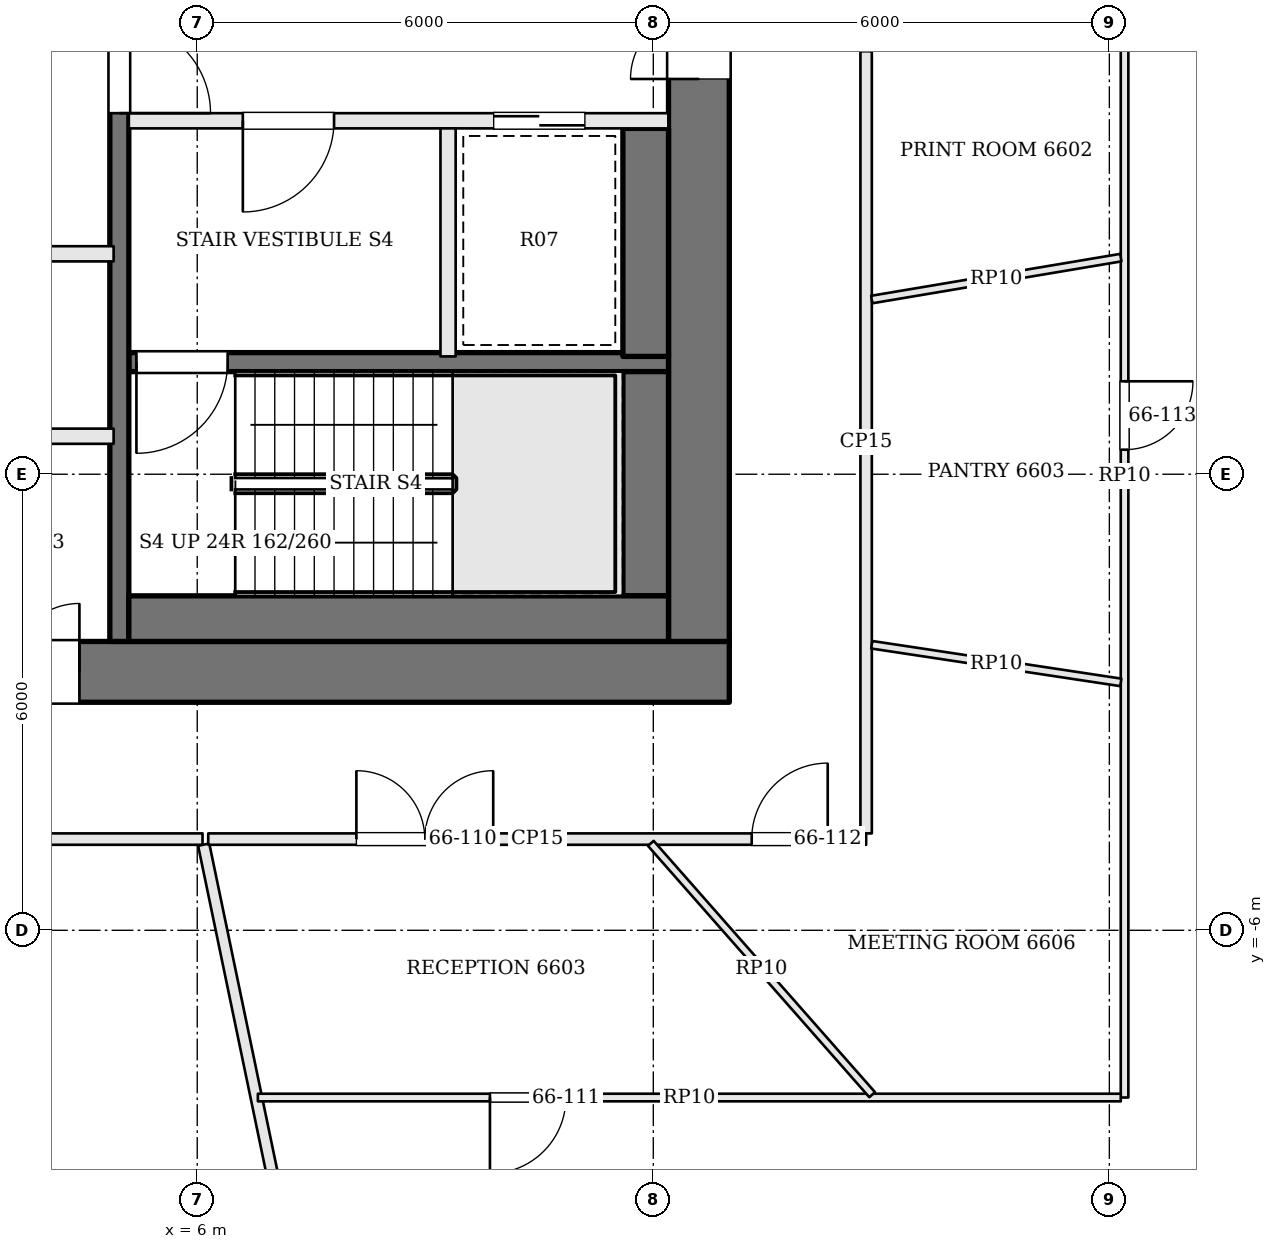
"""IFC4 building model, lengths in metres.
Left out: names, types, materials, properties, quantities, classifications, styles, units other than length and angle.
Written with IfcOpenShell. Run it as: python <this file> out.ifc"""

import sys

from ifc_helpers import new_model, si_unit, direction, frame, frame_2d, origin, place, context, subcontext, project, spatial, rectangle, extrude, element, fill, save


model = new_model("IFC4")
c1 = context("Model", 3, precision=1e-05, world=origin(), true_north=direction((0.0, 1.0)))
c2 = subcontext(c1, "Body", "Model", "MODEL_VIEW")
j1 = project(units=[si_unit("LENGTHUNIT", "METRE"), si_unit("PLANEANGLEUNIT", "RADIAN")], contexts=[c1])
p1 = place(None, origin())
s1 = spatial("IfcSite", under=j1, at=p1, CompositionType="ELEMENT")
p2 = place(p1, origin())
s2 = spatial("IfcBuilding", under=s1, at=p2, CompositionType="ELEMENT")
p3 = place(p2, frame((0.0, 0.0, 268.8)))
s3 = spatial("IfcBuildingStorey", under=s2, at=p3, CompositionType="ELEMENT", Elevation=268.8)
p4 = place(p3, frame((-13.0, -2.6, 0.0), z_axis=(0.0, 0.0, 1.0), x_axis=(1.0, 0.0, 0.0)))
e1 = element("IfcWall", 1, at=p4, inside=s3, PredefinedType="SHEAR", context=c2, shape_type="SweptSolid", body=[
    extrude(rectangle(XDim=26.0, YDim=0.8, at=frame_2d((13.0, 0.0))), origin(), (0.0, 0.0, 1.0), 3.9),
])
p5 = place(p4, frame((9.2, 0.0, 0.0)))
e2 = element("IfcOpeningElement", 2, at=p5, cuts=e1, PredefinedType="OPENING", context=c2, shape_type="SweptSolid", body=[
    extrude(rectangle(XDim=0.9, YDim=2.1, at=frame_2d((0.45, 1.05))), frame((0.0, 0.41, 0.0), z_axis=(0.0, -1.0, 0.0), x_axis=(1.0, 0.0, 0.0)), (0.0, 0.0, 1.0), 0.82),
])
p6 = place(p4, frame((12.3, 0.0, 0.0)))
e3 = element("IfcOpeningElement", 3, at=p6, cuts=e1, PredefinedType="OPENING", context=c2, shape_type="SweptSolid", body=[
    extrude(rectangle(XDim=0.9, YDim=2.1, at=frame_2d((0.45, 1.05))), frame((0.0, 0.41, 0.0), z_axis=(0.0, -1.0, 0.0), x_axis=(1.0, 0.0, 0.0)), (0.0, 0.0, 1.0), 0.82),
])
p7 = place(p4, frame((14.7, 0.0, 0.0)))
e4 = element("IfcOpeningElement", 4, at=p7, cuts=e1, PredefinedType="OPENING", context=c2, shape_type="SweptSolid", body=[
    extrude(rectangle(XDim=1.0, YDim=2.1, at=frame_2d((0.5, 1.05))), frame((0.0, 0.41, 0.0), z_axis=(0.0, -1.0, 0.0), x_axis=(1.0, 0.0, 0.0)), (0.0, 0.0, 1.0), 0.82),
])
p8 = place(p4, frame((16.55, 0.0, 0.0)))
e5 = element("IfcOpeningElement", 5, at=p8, cuts=e1, PredefinedType="OPENING", context=c2, shape_type="SweptSolid", body=[
    extrude(rectangle(XDim=0.9, YDim=2.1, at=frame_2d((0.45, 1.05))), frame((0.0, 0.41, 0.0), z_axis=(0.0, -1.0, 0.0), x_axis=(1.0, 0.0, 0.0)), (0.0, 0.0, 1.0), 0.82),
])
p9 = place(p3, frame((12.6, -2.2, 0.0), z_axis=(0.0, 0.0, 1.0), x_axis=(0.0, 1.0, 0.0)))
e6 = element("IfcWall", 6, at=p9, inside=s3, PredefinedType="SHEAR", context=c2, shape_type="SweptSolid", body=[
    extrude(rectangle(XDim=13.4, YDim=0.8, at=frame_2d((6.7, 0.0))), origin(), (0.0, 0.0, 1.0), 3.9),
])
p10 = place(p9, frame((7.4, 0.0, 0.0)))
e7 = element("IfcOpeningElement", 7, at=p10, cuts=e6, PredefinedType="OPENING", context=c2, shape_type="SweptSolid", body=[
    extrude(rectangle(XDim=1.8, YDim=2.1, at=frame_2d((0.9, 1.05))), frame((0.0, 0.41, 0.0), z_axis=(0.0, -1.0, 0.0), x_axis=(1.0, 0.0, 0.0)), (0.0, 0.0, 1.0), 0.82),
])
p11 = place(p3, frame((12.2, 4.65, 0.0), z_axis=(0.0, 0.0, 1.0), x_axis=(-1.0, 0.0, 0.0)))
e8 = element("IfcWall", 8, at=p11, inside=s3, PredefinedType="SOLIDWALL", context=c2, shape_type="SweptSolid", body=[
    extrude(rectangle(XDim=7.1, YDim=0.2, at=frame_2d((3.55, 0.0))), origin(), (0.0, 0.0, 1.0), 3.7),
])
p12 = place(p11, frame((4.4, 0.0, 0.0)))
e9 = element("IfcOpeningElement", 9, at=p12, cuts=e8, PredefinedType="OPENING", context=c2, shape_type="SweptSolid", body=[
    extrude(rectangle(XDim=1.2, YDim=2.1, at=frame_2d((0.6, 1.05))), frame((0.0, 0.11, 0.0), z_axis=(0.0, -1.0, 0.0), x_axis=(1.0, 0.0, 0.0)), (0.0, 0.0, 1.0), 0.22),
])
p13 = place(p11, frame((1.1, 0.0, 0.0)))
e10 = element("IfcOpeningElement", 10, at=p13, cuts=e8, PredefinedType="OPENING", context=c2, shape_type="SweptSolid", body=[
    extrude(rectangle(XDim=1.2, YDim=2.1, at=frame_2d((0.6, 1.05))), frame((0.0, 0.11, 0.0), z_axis=(0.0, -1.0, 0.0), x_axis=(1.0, 0.0, 0.0)), (0.0, 0.0, 1.0), 0.22),
])
p14 = place(p3, frame((12.2, 1.475, 0.0), z_axis=(0.0, 0.0, 1.0), x_axis=(-1.0, 0.0, 0.0)))
e11 = element("IfcWall", 11, at=p14, inside=s3, PredefinedType="SOLIDWALL", context=c2, shape_type="SweptSolid", body=[
    extrude(rectangle(XDim=7.1, YDim=0.25, at=frame_2d((3.55, 0.0))), origin(), (0.0, 0.0, 1.0), 3.7),
])
p15 = place(p14, frame((5.8, 0.0, 0.0)))
e12 = element("IfcOpeningElement", 12, at=p15, cuts=e11, PredefinedType="OPENING", context=c2, shape_type="SweptSolid", body=[
    extrude(rectangle(XDim=1.2, YDim=2.1, at=frame_2d((0.6, 1.05))), frame((0.0, 0.135, 0.0), z_axis=(0.0, -1.0, 0.0), x_axis=(1.0, 0.0, 0.0)), (0.0, 0.0, 1.0), 0.27),
])
p16 = place(p3, frame((9.3, 4.55, 0.0), z_axis=(0.0, 0.0, 1.0), x_axis=(0.0, -1.0, 0.0)))
e13 = element("IfcWall", 13, at=p16, inside=s3, PredefinedType="SOLIDWALL", context=c2, shape_type="SweptSolid", body=[
    extrude(rectangle(XDim=3.0, YDim=0.2, at=frame_2d((1.5, 0.0))), origin(), (0.0, 0.0, 1.0), 3.7),
])
p17 = place(p3, frame((4.975, 11.2, 0.0), z_axis=(0.0, 0.0, 1.0), x_axis=(0.0, -1.0, 0.0)))
e14 = element("IfcWall", 14, at=p17, inside=s3, PredefinedType="SOLIDWALL", context=c2, shape_type="SweptSolid", body=[
    extrude(rectangle(XDim=13.4, YDim=0.25, at=frame_2d((6.7, 0.0))), origin(), (0.0, 0.0, 1.0), 3.7),
])
p18 = place(p17, frame((5.25, 0.0, 0.0)))
e15 = element("IfcOpeningElement", 15, at=p18, cuts=e14, PredefinedType="OPENING", context=c2, shape_type="SweptSolid", body=[
    extrude(rectangle(XDim=1.2, YDim=2.1, at=frame_2d((0.6, 1.05))), frame((0.0, 0.135, 0.0), z_axis=(0.0, -1.0, 0.0), x_axis=(1.0, 0.0, 0.0)), (0.0, 0.0, 1.0), 0.27),
])
p19 = place(p3, frame((11.9, 4.55, 0.0), z_axis=(0.0, 0.0, 1.0), x_axis=(0.0, -1.0, 0.0)))
e16 = element("IfcWall", 16, at=p19, inside=s3, PredefinedType="SOLIDWALL", context=c2, shape_type="SweptSolid", body=[
    extrude(rectangle(XDim=3.0, YDim=0.6, at=frame_2d((1.5, 0.0))), origin(), (0.0, 0.0, 1.0), 3.7),
])
p20 = place(p3, frame((11.9, 1.35, 0.0), z_axis=(0.0, 0.0, 1.0), x_axis=(0.0, -1.0, 0.0)))
e17 = element("IfcWall", 17, at=p20, inside=s3, PredefinedType="SOLIDWALL", context=c2, shape_type="SweptSolid", body=[
    extrude(rectangle(XDim=2.95, YDim=0.6, at=frame_2d((1.475, 0.0))), origin(), (0.0, 0.0, 1.0), 3.7),
])
p21 = place(p3, frame((12.2, -1.9, 0.0), z_axis=(0.0, 0.0, 1.0), x_axis=(-1.0, 0.0, 0.0)))
e18 = element("IfcWall", 18, at=p21, inside=s3, PredefinedType="SOLIDWALL", context=c2, shape_type="SweptSolid", body=[
    extrude(rectangle(XDim=7.1, YDim=0.6, at=frame_2d((3.55, 0.0))), origin(), (0.0, 0.0, 1.0), 3.7),
])
p22 = place(p3, frame((-4.9, 0.5, 0.0), z_axis=(0.0, 0.0, 1.0), x_axis=(1.0, 0.0, 0.0)))
e19 = element("IfcWall", 19, at=p22, inside=s3, PredefinedType="SOLIDWALL", context=c2, shape_type="SweptSolid", body=[
    extrude(rectangle(XDim=9.8, YDim=0.2, at=frame_2d((4.9, 0.0))), origin(), (0.0, 0.0, 1.0), 3.7),
])
p23 = place(p3, frame((-4.9, 2.9, 0.0), z_axis=(0.0, 0.0, 1.0), x_axis=(1.0, 0.0, 0.0)))
e20 = element("IfcWall", 20, at=p23, inside=s3, PredefinedType="SOLIDWALL", context=c2, shape_type="SweptSolid", body=[
    extrude(rectangle(XDim=9.8, YDim=0.2, at=frame_2d((4.9, 0.0))), origin(), (0.0, 0.0, 1.0), 3.7),
])
p24 = place(p23, frame((0.675, 0.0, 0.0)))
e21 = element("IfcOpeningElement", 21, at=p24, cuts=e20, PredefinedType="OPENING", context=c2, shape_type="SweptSolid", body=[
    extrude(rectangle(XDim=1.1, YDim=2.1, at=frame_2d((0.55, 1.05))), frame((0.0, 0.11, 0.0), z_axis=(0.0, -1.0, 0.0), x_axis=(1.0, 0.0, 0.0)), (0.0, 0.0, 1.0), 0.22),
])
p25 = place(p23, frame((2.613, 0.0, 0.0)))
e22 = element("IfcOpeningElement", 22, at=p25, cuts=e20, PredefinedType="OPENING", context=c2, shape_type="SweptSolid", body=[
    extrude(rectangle(XDim=0.9, YDim=2.1, at=frame_2d((0.45, 1.05))), frame((0.0, 0.11, 0.0), z_axis=(0.0, -1.0, 0.0), x_axis=(1.0, 0.0, 0.0)), (0.0, 0.0, 1.0), 0.22),
])
p26 = place(p23, frame((4.35, 0.0, 0.0)))
e23 = element("IfcOpeningElement", 23, at=p26, cuts=e20, PredefinedType="OPENING", context=c2, shape_type="SweptSolid", body=[
    extrude(rectangle(XDim=1.1, YDim=2.1, at=frame_2d((0.55, 1.05))), frame((0.0, 0.11, 0.0), z_axis=(0.0, -1.0, 0.0), x_axis=(1.0, 0.0, 0.0)), (0.0, 0.0, 1.0), 0.22),
])
p27 = place(p23, frame((7.463, 0.0, 0.0)))
e24 = element("IfcOpeningElement", 24, at=p27, cuts=e20, PredefinedType="OPENING", context=c2, shape_type="SweptSolid", body=[
    extrude(rectangle(XDim=1.0, YDim=2.1, at=frame_2d((0.5, 1.05))), frame((0.0, 0.11, 0.0), z_axis=(0.0, -1.0, 0.0), x_axis=(1.0, 0.0, 0.0)), (0.0, 0.0, 1.0), 0.22),
])
p28 = place(p3, frame((-13.646, -4.8, 0.0), z_axis=(0.0, 0.0, 1.0), x_axis=(1.0, 0.0, 0.0)))
e25 = element("IfcWall", 25, at=p28, inside=s3, PredefinedType="PARTITIONING", context=c2, shape_type="SweptSolid", body=[
    extrude(rectangle(XDim=19.716, YDim=0.15, at=frame_2d((9.858, 0.0))), origin(), (0.0, 0.0, 1.0), 3.198),
])
p29 = place(p28, frame((8.921, 0.0, 0.0)))
e26 = element("IfcOpeningElement", 26, at=p29, cuts=e25, PredefinedType="OPENING", context=c2, shape_type="SweptSolid", body=[
    extrude(rectangle(XDim=1.8, YDim=2.1, at=frame_2d((0.9, 1.05))), frame((0.0, 0.085, 0.0), z_axis=(0.0, -1.0, 0.0), x_axis=(1.0, 0.0, 0.0)), (0.0, 0.0, 1.0), 0.17),
])
p30 = place(p3, frame((8.341, -15.713, 0.0), z_axis=(0.0, 0.0, 1.0), x_axis=(-0.203751717625, 0.97902259298, 0.0)))
e27 = element("IfcWall", 27, at=p30, inside=s3, PredefinedType="PARTITIONING", context=c2, shape_type="SweptSolid", body=[
    extrude(rectangle(XDim=11.072, YDim=0.15, at=frame_2d((5.536, 0.0))), origin(), (0.0, 0.0, 1.0), 3.184),
])
p31 = place(p3, frame((6.145, -4.8, 0.0), z_axis=(0.0, 0.0, 1.0), x_axis=(1.0, 0.0, 0.0)))
e28 = element("IfcWall", 28, at=p31, inside=s3, PredefinedType="PARTITIONING", context=c2, shape_type="SweptSolid", body=[
    extrude(rectangle(XDim=8.655, YDim=0.15, at=frame_2d((4.328, 0.0))), origin(), (0.0, 0.0, 1.0), 3.198),
])
p32 = place(p31, frame((1.949, 0.0, 0.0)))
e29 = element("IfcOpeningElement", 29, at=p32, cuts=e28, PredefinedType="OPENING", context=c2, shape_type="SweptSolid", body=[
    extrude(rectangle(XDim=1.8, YDim=2.1, at=frame_2d((0.9, 1.05))), frame((0.0, 0.085, 0.0), z_axis=(0.0, -1.0, 0.0), x_axis=(1.0, 0.0, 0.0)), (0.0, 0.0, 1.0), 0.17),
])
p33 = place(p31, frame((7.15, 0.0, 0.0)))
e30 = element("IfcOpeningElement", 30, at=p33, cuts=e28, PredefinedType="OPENING", context=c2, shape_type="SweptSolid", body=[
    extrude(rectangle(XDim=1.0, YDim=2.4, at=frame_2d((0.5, 1.2))), frame((0.0, 0.085, 0.0), z_axis=(0.0, -1.0, 0.0), x_axis=(1.0, 0.0, 0.0)), (0.0, 0.0, 1.0), 0.17),
])
p34 = place(p3, frame((14.8, -4.725, 0.0), z_axis=(0.0, 0.0, 1.0), x_axis=(0.0, 1.0, 0.0)))
e31 = element("IfcWall", 31, at=p34, inside=s3, PredefinedType="PARTITIONING", context=c2, shape_type="SweptSolid", body=[
    extrude(rectangle(XDim=10.29, YDim=0.15, at=frame_2d((5.145, 0.0))), origin(), (0.0, 0.0, 1.0), 3.198),
])
p35 = place(p3, frame((18.2, 8.161, 0.0), z_axis=(0.0, 0.0, 1.0), x_axis=(0.0, -1.0, 0.0)))
e32 = element("IfcWall", 32, at=p35, inside=s3, PredefinedType="PARTITIONING", context=c2, shape_type="SweptSolid", body=[
    extrude(rectangle(XDim=16.361, YDim=0.1, at=frame_2d((8.18, 0.0))), origin(), (0.0, 0.0, 1.0), 3.184),
])
p36 = place(p35, frame((6.938, 0.0, 0.0)))
e33 = element("IfcOpeningElement", 33, at=p36, cuts=e32, PredefinedType="OPENING", context=c2, shape_type="SweptSolid", body=[
    extrude(rectangle(XDim=0.9, YDim=2.1, at=frame_2d((0.45, 1.05))), frame((0.0, 0.06, 0.0), z_axis=(0.0, -1.0, 0.0), x_axis=(1.0, 0.0, 0.0)), (0.0, 0.0, 1.0), 0.12),
])
p37 = place(p35, frame((1.652, 0.0, 0.0)))
e34 = element("IfcOpeningElement", 34, at=p37, cuts=e32, PredefinedType="OPENING", context=c2, shape_type="SweptSolid", body=[
    extrude(rectangle(XDim=0.9, YDim=2.1, at=frame_2d((0.45, 1.05))), frame((0.0, 0.06, 0.0), z_axis=(0.0, -1.0, 0.0), x_axis=(1.0, 0.0, 0.0)), (0.0, 0.0, 1.0), 0.12),
])
p38 = place(p3, frame((18.15, -8.2, 0.0), z_axis=(0.0, 0.0, 1.0), x_axis=(-1.0, 0.0, 0.0)))
e35 = element("IfcWall", 35, at=p38, inside=s3, PredefinedType="PARTITIONING", context=c2, shape_type="SweptSolid", body=[
    extrude(rectangle(XDim=11.352, YDim=0.1, at=frame_2d((5.676, 0.0))), origin(), (0.0, 0.0, 1.0), 3.184),
])
p39 = place(p38, frame((7.299, 0.0, 0.0)))
e36 = element("IfcOpeningElement", 36, at=p39, cuts=e35, PredefinedType="OPENING", context=c2, shape_type="SweptSolid", body=[
    extrude(rectangle(XDim=1.0, YDim=2.1, at=frame_2d((0.5, 1.05))), frame((0.0, 0.06, 0.0), z_axis=(0.0, -1.0, 0.0), x_axis=(1.0, 0.0, 0.0)), (0.0, 0.0, 1.0), 0.12),
])
p40 = place(p3, frame((11.967, -4.856, 0.0), z_axis=(0.0, 0.0, 1.0), x_axis=(0.660945113881, -0.750434245245, 0.0)))
e37 = element("IfcWall", 37, at=p40, inside=s3, PredefinedType="PARTITIONING", context=c2, shape_type="SweptSolid", body=[
    extrude(rectangle(XDim=4.406, YDim=0.1, at=frame_2d((2.203, 0.0))), origin(), (0.0, 0.0, 1.0), 3.184),
])
p41 = place(p3, frame((14.874, -2.243, 0.0), z_axis=(0.0, 0.0, 1.0), x_axis=(0.988784515255, -0.149349196157, 0.0)))
e38 = element("IfcWall", 38, at=p41, inside=s3, PredefinedType="PARTITIONING", context=c2, shape_type="SweptSolid", body=[
    extrude(rectangle(XDim=3.313, YDim=0.1, at=frame_2d((1.657, 0.0))), origin(), (0.0, 0.0, 1.0), 3.184),
])
p42 = place(p3, frame((14.874, 2.298, 0.0), z_axis=(0.0, 0.0, 1.0), x_axis=(0.986140556788, 0.165912031684, 0.0)))
e39 = element("IfcWall", 39, at=p42, inside=s3, PredefinedType="PARTITIONING", context=c2, shape_type="SweptSolid", body=[
    extrude(rectangle(XDim=3.323, YDim=0.1, at=frame_2d((1.661, 0.0))), origin(), (0.0, 0.0, 1.0), 3.184),
])
p43 = place(p10, origin())
e40 = element("IfcDoor", 40, at=p43, inside=s3, OperationType="DOUBLE_DOOR_SINGLE_SWING", PredefinedType="DOOR", context=c2, shape_type="SweptSolid", body=[
    extrude(rectangle(XDim=1.8, YDim=2.1, at=frame_2d((0.9, 1.05))), frame((0.0, 0.025, 0.0), z_axis=(0.0, -1.0, 0.0), x_axis=(1.0, 0.0, 0.0)), (0.0, 0.0, 1.0), 0.05),
])
fill(e7, e40)
p44 = place(p18, origin())
e41 = element("IfcDoor", 41, at=p44, inside=s3, OperationType="SINGLE_SWING_RIGHT", PredefinedType="DOOR", context=c2, shape_type="SweptSolid", body=[
    extrude(rectangle(XDim=1.2, YDim=2.1, at=frame_2d((0.6, 1.05))), frame((0.0, 0.025, 0.0), z_axis=(0.0, -1.0, 0.0), x_axis=(1.0, 0.0, 0.0)), (0.0, 0.0, 1.0), 0.05),
])
fill(e15, e41)
p45 = place(p12, origin())
e42 = element("IfcDoor", 42, at=p45, inside=s3, OperationType="SINGLE_SWING_RIGHT", PredefinedType="DOOR", context=c2, shape_type="SweptSolid", body=[
    extrude(rectangle(XDim=1.2, YDim=2.1, at=frame_2d((0.6, 1.05))), frame((0.0, 0.025, 0.0), z_axis=(0.0, -1.0, 0.0), x_axis=(1.0, 0.0, 0.0)), (0.0, 0.0, 1.0), 0.05),
])
fill(e9, e42)
p46 = place(p15, origin())
e43 = element("IfcDoor", 43, at=p46, inside=s3, OperationType="SINGLE_SWING_RIGHT", PredefinedType="DOOR", context=c2, shape_type="SweptSolid", body=[
    extrude(rectangle(XDim=1.2, YDim=2.1, at=frame_2d((0.6, 1.05))), frame((0.0, 0.025, 0.0), z_axis=(0.0, -1.0, 0.0), x_axis=(1.0, 0.0, 0.0)), (0.0, 0.0, 1.0), 0.05),
])
fill(e12, e43)
p47 = place(p13, origin())
e44 = element("IfcDoor", 44, at=p47, inside=s3, OperationType="SLIDING_TO_RIGHT", PredefinedType="DOOR", context=c2, shape_type="SweptSolid", body=[
    extrude(rectangle(XDim=1.2, YDim=2.1, at=frame_2d((0.6, 1.05))), frame((0.0, 0.025, 0.0), z_axis=(0.0, -1.0, 0.0), x_axis=(1.0, 0.0, 0.0)), (0.0, 0.0, 1.0), 0.05),
])
fill(e10, e44)
p48 = place(p8, origin())
e45 = element("IfcDoor", 45, at=p48, inside=s3, OperationType="SINGLE_SWING_RIGHT", PredefinedType="DOOR", context=c2, shape_type="SweptSolid", body=[
    extrude(rectangle(XDim=0.9, YDim=2.1, at=frame_2d((0.45, 1.05))), frame((0.0, 0.025, 0.0), z_axis=(0.0, -1.0, 0.0), x_axis=(1.0, 0.0, 0.0)), (0.0, 0.0, 1.0), 0.05),
])
fill(e5, e45)
p49 = place(p32, origin())
e46 = element("IfcDoor", 46, at=p49, inside=s3, OperationType="DOUBLE_DOOR_SINGLE_SWING", PredefinedType="DOOR", context=c2, shape_type="SweptSolid", body=[
    extrude(rectangle(XDim=1.8, YDim=2.1, at=frame_2d((0.9, 1.05))), frame((0.0, 0.025, 0.0), z_axis=(0.0, -1.0, 0.0), x_axis=(1.0, 0.0, 0.0)), (0.0, 0.0, 1.0), 0.05),
])
fill(e29, e46)
p50 = place(p39, origin())
e47 = element("IfcDoor", 47, at=p50, inside=s3, OperationType="SINGLE_SWING_RIGHT", PredefinedType="DOOR", context=c2, shape_type="SweptSolid", body=[
    extrude(rectangle(XDim=1.0, YDim=2.1, at=frame_2d((0.5, 1.05))), frame((0.0, 0.025, 0.0), z_axis=(0.0, -1.0, 0.0), x_axis=(1.0, 0.0, 0.0)), (0.0, 0.0, 1.0), 0.05),
])
fill(e36, e47)
p51 = place(p33, origin())
e48 = element("IfcDoor", 48, at=p51, inside=s3, OperationType="SINGLE_SWING_RIGHT", PredefinedType="DOOR", context=c2, shape_type="SweptSolid", body=[
    extrude(rectangle(XDim=1.0, YDim=2.4, at=frame_2d((0.5, 1.2))), frame((0.0, 0.025, 0.0), z_axis=(0.0, -1.0, 0.0), x_axis=(1.0, 0.0, 0.0)), (0.0, 0.0, 1.0), 0.05),
])
fill(e30, e48)
p52 = place(p36, origin())
e49 = element("IfcDoor", 49, at=p52, inside=s3, OperationType="SINGLE_SWING_LEFT", PredefinedType="DOOR", context=c2, shape_type="SweptSolid", body=[
    extrude(rectangle(XDim=0.9, YDim=2.1, at=frame_2d((0.45, 1.05))), frame((0.0, 0.025, 0.0), z_axis=(0.0, -1.0, 0.0), x_axis=(1.0, 0.0, 0.0)), (0.0, 0.0, 1.0), 0.05),
])
fill(e33, e49)
save(model, sys.argv[1])
